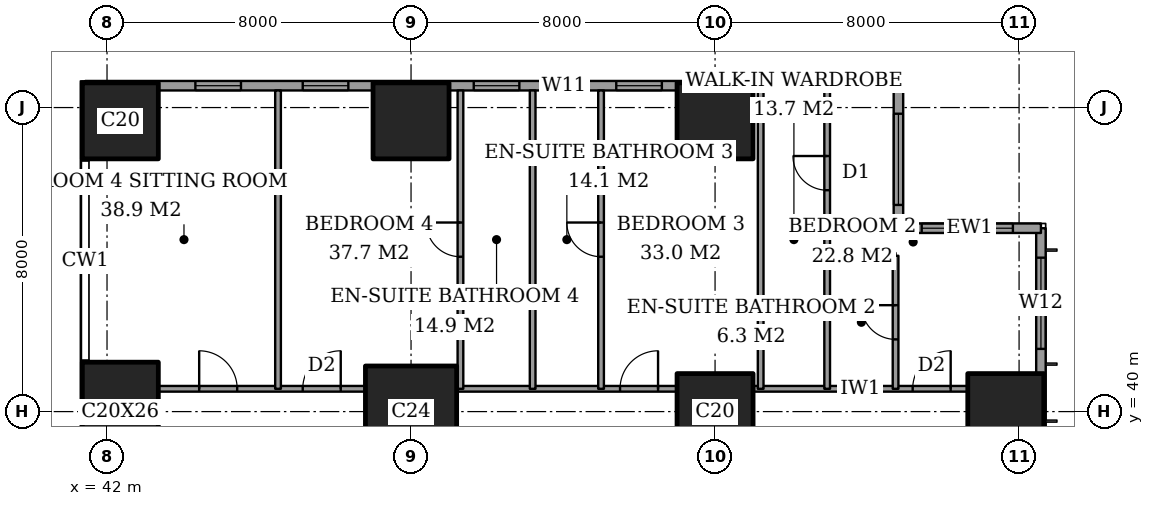
"""IFC4 building model, lengths in metres.
Left out: names, types, materials, properties, quantities, classifications, styles, units other than length and angle.
Written with IfcOpenShell. Run it as: python <this file> out.ifc"""

import sys

from ifc_helpers import new_model, si_unit, direction, frame, frame_2d, origin, origin_2d, place, context, subcontext, project, spatial, rectangle, extrude, element, fill, save


model = new_model("IFC4")
c1 = context("Model", 3, precision=1e-05, world=origin(), true_north=direction((0.0, 1.0)))
c2 = subcontext(c1, "Body", "Model", "MODEL_VIEW")
j1 = project(units=[si_unit("LENGTHUNIT", "METRE"), si_unit("PLANEANGLEUNIT", "RADIAN")], contexts=[c1])
p1 = place(None, origin())
s1 = spatial("IfcSite", under=j1, at=p1, CompositionType="ELEMENT")
p2 = place(p1, origin())
s2 = spatial("IfcBuilding", under=s1, at=p2, CompositionType="ELEMENT")
p3 = place(p2, frame((0.0, 0.0, 168.2)))
s3 = spatial("IfcBuildingStorey", under=s2, at=p3, CompositionType="ELEMENT", Elevation=168.2)
p4 = place(p3, frame((42.35, 40.0, 0.0), z_axis=(0.0, 0.0, 1.0), x_axis=(1.0, 0.0, 0.0)))
e1 = element("IfcColumn", 1, at=p4, inside=s3, PredefinedType="COLUMN", context=c2, shape_type="SweptSolid", body=[
    extrude(rectangle(XDim=2.0, YDim=2.6, at=origin_2d()), origin(), (0.0, 0.0, 1.0), 3.6),
])
p5 = place(p3, frame((42.35, 47.65, 0.0), z_axis=(0.0, 0.0, 1.0), x_axis=(1.0, 0.0, 0.0)))
e2 = element("IfcColumn", 2, at=p5, inside=s3, PredefinedType="COLUMN", context=c2, shape_type="SweptSolid", body=[
    extrude(rectangle(XDim=2.0, YDim=2.0, at=origin_2d()), origin(), (0.0, 0.0, 1.0), 3.6),
])
p6 = place(p3, frame((50.0, 40.0, 0.0), z_axis=(0.0, 0.0, 1.0), x_axis=(1.0, 0.0, 0.0)))
e3 = element("IfcColumn", 3, at=p6, inside=s3, PredefinedType="COLUMN", context=c2, shape_type="SweptSolid", body=[
    extrude(rectangle(XDim=2.4, YDim=2.4, at=origin_2d()), origin(), (0.0, 0.0, 1.0), 3.6),
])
for number, where, z_axis, x_axis in (
    (4, (50.0, 47.65, 0.0), (0.0, 0.0, 1.0), (1.0, 0.0, 0.0)),
    (5, (58.0, 40.0, 0.0), (0.0, 0.0, 1.0), (1.0, 0.0, 0.0)),
    (6, (58.0, 47.65, 0.0), (0.0, 0.0, 1.0), (1.0, 0.0, 0.0)),
    (7, (65.65, 40.0, 0.0), (0.0, 0.0, 1.0), (1.0, 0.0, 0.0)),
):
    element("IfcColumn", number, at=place(p3, frame(where, z_axis=z_axis, x_axis=x_axis)), inside=s3, PredefinedType="COLUMN", context=c2, shape_type="SweptSolid", body=[
        extrude(rectangle(XDim=2.0, YDim=2.0, at=origin_2d()), origin(), (0.0, 0.0, 1.0), 3.6),
    ])
p7 = place(p3, frame((66.575, 3.175, 0.0), z_axis=(0.0, 0.0, 1.0), x_axis=(0.0, 1.0, 0.0)))
e8 = element("IfcWall", 8, at=p7, inside=s3, PredefinedType="SOLIDWALL", context=c2, shape_type="SweptSolid", body=[
    extrude(rectangle(XDim=41.65, YDim=0.25, at=frame_2d((20.825, 0.0))), origin(), (0.0, 0.0, 1.0), 3.6),
])
p8 = place(p7, frame((0.775, 0.0, 0.4)))
e9 = element("IfcOpeningElement", 9, at=p8, cuts=e8, PredefinedType="OPENING", context=c2, shape_type="SweptSolid", body=[
    extrude(rectangle(XDim=2.4, YDim=2.2, at=frame_2d((1.2, 1.1))), frame((0.0, 0.135, 0.0), z_axis=(0.0, -1.0, 0.0), x_axis=(1.0, 0.0, 0.0)), (0.0, 0.0, 1.0), 0.27),
])
p9 = place(p7, frame((6.225, 0.0, 0.4)))
e10 = element("IfcOpeningElement", 10, at=p9, cuts=e8, PredefinedType="OPENING", context=c2, shape_type="SweptSolid", body=[
    extrude(rectangle(XDim=1.2, YDim=2.2, at=frame_2d((0.6, 1.1))), frame((0.0, 0.135, 0.0), z_axis=(0.0, -1.0, 0.0), x_axis=(1.0, 0.0, 0.0)), (0.0, 0.0, 1.0), 0.27),
])
p10 = place(p7, frame((8.475, 0.0, 0.4)))
e11 = element("IfcOpeningElement", 11, at=p10, cuts=e8, PredefinedType="OPENING", context=c2, shape_type="SweptSolid", body=[
    extrude(rectangle(XDim=2.4, YDim=2.2, at=frame_2d((1.2, 1.1))), frame((0.0, 0.135, 0.0), z_axis=(0.0, -1.0, 0.0), x_axis=(1.0, 0.0, 0.0)), (0.0, 0.0, 1.0), 0.27),
])
p11 = place(p7, frame((15.775, 0.0, 0.4)))
e12 = element("IfcOpeningElement", 12, at=p11, cuts=e8, PredefinedType="OPENING", context=c2, shape_type="SweptSolid", body=[
    extrude(rectangle(XDim=2.4, YDim=2.2, at=frame_2d((1.2, 1.1))), frame((0.0, 0.135, 0.0), z_axis=(0.0, -1.0, 0.0), x_axis=(1.0, 0.0, 0.0)), (0.0, 0.0, 1.0), 0.27),
])
p12 = place(p7, frame((23.475, 0.0, 0.4)))
e13 = element("IfcOpeningElement", 13, at=p12, cuts=e8, PredefinedType="OPENING", context=c2, shape_type="SweptSolid", body=[
    extrude(rectangle(XDim=2.4, YDim=2.2, at=frame_2d((1.2, 1.1))), frame((0.0, 0.135, 0.0), z_axis=(0.0, -1.0, 0.0), x_axis=(1.0, 0.0, 0.0)), (0.0, 0.0, 1.0), 0.27),
])
p13 = place(p7, frame((30.975, 0.0, 0.4)))
e14 = element("IfcOpeningElement", 14, at=p13, cuts=e8, PredefinedType="OPENING", context=c2, shape_type="SweptSolid", body=[
    extrude(rectangle(XDim=2.4, YDim=2.2, at=frame_2d((1.2, 1.1))), frame((0.0, 0.135, 0.0), z_axis=(0.0, -1.0, 0.0), x_axis=(1.0, 0.0, 0.0)), (0.0, 0.0, 1.0), 0.27),
])
p14 = place(p7, frame((34.5, 0.0, 0.4)))
e15 = element("IfcOpeningElement", 15, at=p14, cuts=e8, PredefinedType="OPENING", context=c2, shape_type="SweptSolid", body=[
    extrude(rectangle(XDim=1.2, YDim=2.2, at=frame_2d((0.6, 1.1))), frame((0.0, 0.135, 0.0), z_axis=(0.0, -1.0, 0.0), x_axis=(1.0, 0.0, 0.0)), (0.0, 0.0, 1.0), 0.27),
])
p15 = place(p7, frame((38.475, 0.0, 0.4)))
e16 = element("IfcOpeningElement", 16, at=p15, cuts=e8, PredefinedType="OPENING", context=c2, shape_type="SweptSolid", body=[
    extrude(rectangle(XDim=2.4, YDim=2.2, at=frame_2d((1.2, 1.1))), frame((0.0, 0.135, 0.0), z_axis=(0.0, -1.0, 0.0), x_axis=(1.0, 0.0, 0.0)), (0.0, 0.0, 1.0), 0.27),
])
p16 = place(p3, frame((66.575, 44.825, 0.0), z_axis=(0.0, 0.0, 1.0), x_axis=(-1.0, 0.0, 0.0)))
e17 = element("IfcWall", 17, at=p16, inside=s3, PredefinedType="SOLIDWALL", context=c2, shape_type="SweptSolid", body=[
    extrude(rectangle(XDim=3.75, YDim=0.25, at=frame_2d((1.875, 0.0))), origin(), (0.0, 0.0, 1.0), 3.6),
])
p17 = place(p16, frame((0.738, 0.0, 0.4)))
e18 = element("IfcOpeningElement", 18, at=p17, cuts=e17, PredefinedType="OPENING", context=c2, shape_type="SweptSolid", body=[
    extrude(rectangle(XDim=2.4, YDim=2.2, at=frame_2d((1.2, 1.1))), frame((0.0, 0.135, 0.0), z_axis=(0.0, -1.0, 0.0), x_axis=(1.0, 0.0, 0.0)), (0.0, 0.0, 1.0), 0.27),
])
p18 = place(p3, frame((62.825, 44.825, 0.0), z_axis=(0.0, 0.0, 1.0), x_axis=(0.0, 1.0, 0.0)))
e19 = element("IfcWall", 19, at=p18, inside=s3, PredefinedType="SOLIDWALL", context=c2, shape_type="SweptSolid", body=[
    extrude(rectangle(XDim=3.75, YDim=0.25, at=frame_2d((1.875, 0.0))), origin(), (0.0, 0.0, 1.0), 3.6),
])
p19 = place(p18, frame((0.613, 0.0, 0.4)))
e20 = element("IfcOpeningElement", 20, at=p19, cuts=e19, PredefinedType="OPENING", context=c2, shape_type="SweptSolid", body=[
    extrude(rectangle(XDim=2.4, YDim=2.2, at=frame_2d((1.2, 1.1))), frame((0.0, 0.135, 0.0), z_axis=(0.0, -1.0, 0.0), x_axis=(1.0, 0.0, 0.0)), (0.0, 0.0, 1.0), 0.27),
])
p20 = place(p3, frame((62.825, 48.575, 0.0), z_axis=(0.0, 0.0, 1.0), x_axis=(-1.0, 0.0, 0.0)))
e21 = element("IfcWall", 21, at=p20, inside=s3, PredefinedType="SOLIDWALL", context=c2, shape_type="SweptSolid", body=[
    extrude(rectangle(XDim=21.4, YDim=0.25, at=frame_2d((10.7, 0.0))), origin(), (0.0, 0.0, 1.0), 3.6),
])
p21 = place(p20, frame((0.475, 0.0, 0.4)))
e22 = element("IfcOpeningElement", 22, at=p21, cuts=e21, PredefinedType="OPENING", context=c2, shape_type="SweptSolid", body=[
    extrude(rectangle(XDim=1.2, YDim=2.2, at=frame_2d((0.6, 1.1))), frame((0.0, 0.135, 0.0), z_axis=(0.0, -1.0, 0.0), x_axis=(1.0, 0.0, 0.0)), (0.0, 0.0, 1.0), 0.27),
])
p22 = place(p20, frame((2.225, 0.0, 0.4)))
e23 = element("IfcOpeningElement", 23, at=p22, cuts=e21, PredefinedType="OPENING", context=c2, shape_type="SweptSolid", body=[
    extrude(rectangle(XDim=1.2, YDim=2.2, at=frame_2d((0.6, 1.1))), frame((0.0, 0.135, 0.0), z_axis=(0.0, -1.0, 0.0), x_axis=(1.0, 0.0, 0.0)), (0.0, 0.0, 1.0), 0.27),
])
p23 = place(p20, frame((6.225, 0.0, 0.4)))
e24 = element("IfcOpeningElement", 24, at=p23, cuts=e21, PredefinedType="OPENING", context=c2, shape_type="SweptSolid", body=[
    extrude(rectangle(XDim=1.2, YDim=2.2, at=frame_2d((0.6, 1.1))), frame((0.0, 0.135, 0.0), z_axis=(0.0, -1.0, 0.0), x_axis=(1.0, 0.0, 0.0)), (0.0, 0.0, 1.0), 0.27),
])
p24 = place(p20, frame((8.2, 0.0, 0.4)))
e25 = element("IfcOpeningElement", 25, at=p24, cuts=e21, PredefinedType="OPENING", context=c2, shape_type="SweptSolid", body=[
    extrude(rectangle(XDim=1.2, YDim=2.2, at=frame_2d((0.6, 1.1))), frame((0.0, 0.135, 0.0), z_axis=(0.0, -1.0, 0.0), x_axis=(1.0, 0.0, 0.0)), (0.0, 0.0, 1.0), 0.27),
])
p25 = place(p20, frame((9.975, 0.0, 0.4)))
e26 = element("IfcOpeningElement", 26, at=p25, cuts=e21, PredefinedType="OPENING", context=c2, shape_type="SweptSolid", body=[
    extrude(rectangle(XDim=1.2, YDim=2.2, at=frame_2d((0.6, 1.1))), frame((0.0, 0.135, 0.0), z_axis=(0.0, -1.0, 0.0), x_axis=(1.0, 0.0, 0.0)), (0.0, 0.0, 1.0), 0.27),
])
p26 = place(p20, frame((14.475, 0.0, 0.4)))
e27 = element("IfcOpeningElement", 27, at=p26, cuts=e21, PredefinedType="OPENING", context=c2, shape_type="SweptSolid", body=[
    extrude(rectangle(XDim=1.2, YDim=2.2, at=frame_2d((0.6, 1.1))), frame((0.0, 0.135, 0.0), z_axis=(0.0, -1.0, 0.0), x_axis=(1.0, 0.0, 0.0)), (0.0, 0.0, 1.0), 0.27),
])
p27 = place(p20, frame((17.3, 0.0, 0.4)))
e28 = element("IfcOpeningElement", 28, at=p27, cuts=e21, PredefinedType="OPENING", context=c2, shape_type="SweptSolid", body=[
    extrude(rectangle(XDim=1.2, YDim=2.2, at=frame_2d((0.6, 1.1))), frame((0.0, 0.135, 0.0), z_axis=(0.0, -1.0, 0.0), x_axis=(1.0, 0.0, 0.0)), (0.0, 0.0, 1.0), 0.27),
])
p28 = place(p3, frame((43.35, 40.6, 0.0), z_axis=(0.0, 0.0, 1.0), x_axis=(1.0, 0.0, 0.0)))
e29 = element("IfcWall", 29, at=p28, inside=s3, PredefinedType="PARTITIONING", context=c2, shape_type="SweptSolid", body=[
    extrude(rectangle(XDim=5.45, YDim=0.15, at=frame_2d((2.725, 0.0))), origin(), (0.0, 0.0, 1.0), 3.25),
])
p29 = place(p28, frame((3.8, 0.0, 0.0)))
e30 = element("IfcOpeningElement", 30, at=p29, cuts=e29, PredefinedType="OPENING", context=c2, shape_type="SweptSolid", body=[
    extrude(rectangle(XDim=1.0, YDim=2.1, at=frame_2d((0.5, 1.05))), frame((0.0, 0.085, 0.0), z_axis=(0.0, -1.0, 0.0), x_axis=(1.0, 0.0, 0.0)), (0.0, 0.0, 1.0), 0.17),
])
p30 = place(p28, frame((1.075, 0.0, 0.0)))
e31 = element("IfcOpeningElement", 31, at=p30, cuts=e29, PredefinedType="OPENING", context=c2, shape_type="SweptSolid", body=[
    extrude(rectangle(XDim=1.0, YDim=2.1, at=frame_2d((0.5, 1.05))), frame((0.0, 0.085, 0.0), z_axis=(0.0, -1.0, 0.0), x_axis=(1.0, 0.0, 0.0)), (0.0, 0.0, 1.0), 0.17),
])
p31 = place(p3, frame((51.2, 40.6, 0.0), z_axis=(0.0, 0.0, 1.0), x_axis=(1.0, 0.0, 0.0)))
e32 = element("IfcWall", 32, at=p31, inside=s3, PredefinedType="PARTITIONING", context=c2, shape_type="SweptSolid", body=[
    extrude(rectangle(XDim=5.8, YDim=0.15, at=frame_2d((2.9, 0.0))), origin(), (0.0, 0.0, 1.0), 3.25),
])
p32 = place(p31, frame((4.3, 0.0, 0.0)))
e33 = element("IfcOpeningElement", 33, at=p32, cuts=e32, PredefinedType="OPENING", context=c2, shape_type="SweptSolid", body=[
    extrude(rectangle(XDim=1.0, YDim=2.1, at=frame_2d((0.5, 1.05))), frame((0.0, 0.085, 0.0), z_axis=(0.0, -1.0, 0.0), x_axis=(1.0, 0.0, 0.0)), (0.0, 0.0, 1.0), 0.17),
])
p33 = place(p3, frame((59.0, 40.6, 0.0), z_axis=(0.0, 0.0, 1.0), x_axis=(1.0, 0.0, 0.0)))
e34 = element("IfcWall", 34, at=p33, inside=s3, PredefinedType="PARTITIONING", context=c2, shape_type="SweptSolid", body=[
    extrude(rectangle(XDim=5.65, YDim=0.15, at=frame_2d((2.825, 0.0))), origin(), (0.0, 0.0, 1.0), 3.25),
])
p34 = place(p33, frame((4.2, 0.0, 0.0)))
e35 = element("IfcOpeningElement", 35, at=p34, cuts=e34, PredefinedType="OPENING", context=c2, shape_type="SweptSolid", body=[
    extrude(rectangle(XDim=1.0, YDim=2.1, at=frame_2d((0.5, 1.05))), frame((0.0, 0.085, 0.0), z_axis=(0.0, -1.0, 0.0), x_axis=(1.0, 0.0, 0.0)), (0.0, 0.0, 1.0), 0.17),
])
p35 = place(p3, frame((60.95, 44.1, 0.0), z_axis=(0.0, 0.0, 1.0), x_axis=(1.0, 0.0, 0.0)))
e36 = element("IfcWall", 36, at=p35, inside=s3, PredefinedType="PARTITIONING", context=c2, shape_type="SweptSolid", body=[
    extrude(rectangle(XDim=1.8, YDim=0.15, at=frame_2d((0.9, 0.0))), origin(), (0.0, 0.0, 1.0), 3.25),
])
p36 = place(p3, frame((46.5, 40.6, 0.0), z_axis=(0.0, 0.0, 1.0), x_axis=(0.0, 1.0, 0.0)))
e37 = element("IfcWall", 37, at=p36, inside=s3, PredefinedType="PARTITIONING", context=c2, shape_type="SweptSolid", body=[
    extrude(rectangle(XDim=7.85, YDim=0.15, at=frame_2d((3.925, 0.0))), origin(), (0.0, 0.0, 1.0), 3.25),
])
p37 = place(p3, frame((51.3, 40.6, 0.0), z_axis=(0.0, 0.0, 1.0), x_axis=(0.0, 1.0, 0.0)))
e38 = element("IfcWall", 38, at=p37, inside=s3, PredefinedType="PARTITIONING", context=c2, shape_type="SweptSolid", body=[
    extrude(rectangle(XDim=7.85, YDim=0.15, at=frame_2d((3.925, 0.0))), origin(), (0.0, 0.0, 1.0), 3.25),
])
p38 = place(p37, frame((3.475, 0.0, 0.0)))
e39 = element("IfcOpeningElement", 39, at=p38, cuts=e38, PredefinedType="OPENING", context=c2, shape_type="SweptSolid", body=[
    extrude(rectangle(XDim=0.9, YDim=2.1, at=frame_2d((0.45, 1.05))), frame((0.0, 0.085, 0.0), z_axis=(0.0, -1.0, 0.0), x_axis=(1.0, 0.0, 0.0)), (0.0, 0.0, 1.0), 0.17),
])
p39 = place(p3, frame((53.2, 40.6, 0.0), z_axis=(0.0, 0.0, 1.0), x_axis=(0.0, 1.0, 0.0)))
e40 = element("IfcWall", 40, at=p39, inside=s3, PredefinedType="PARTITIONING", context=c2, shape_type="SweptSolid", body=[
    extrude(rectangle(XDim=7.85, YDim=0.15, at=frame_2d((3.925, 0.0))), origin(), (0.0, 0.0, 1.0), 3.25),
])
p40 = place(p3, frame((55.0, 40.6, 0.0), z_axis=(0.0, 0.0, 1.0), x_axis=(0.0, 1.0, 0.0)))
e41 = element("IfcWall", 41, at=p40, inside=s3, PredefinedType="PARTITIONING", context=c2, shape_type="SweptSolid", body=[
    extrude(rectangle(XDim=7.85, YDim=0.15, at=frame_2d((3.925, 0.0))), origin(), (0.0, 0.0, 1.0), 3.25),
])
p41 = place(p40, frame((3.475, 0.0, 0.0)))
e42 = element("IfcOpeningElement", 42, at=p41, cuts=e41, PredefinedType="OPENING", context=c2, shape_type="SweptSolid", body=[
    extrude(rectangle(XDim=0.9, YDim=2.1, at=frame_2d((0.45, 1.05))), frame((0.0, 0.085, 0.0), z_axis=(0.0, -1.0, 0.0), x_axis=(1.0, 0.0, 0.0)), (0.0, 0.0, 1.0), 0.17),
])
p42 = place(p3, frame((59.2, 40.6, 0.0), z_axis=(0.0, 0.0, 1.0), x_axis=(0.0, 1.0, 0.0)))
e43 = element("IfcWall", 43, at=p42, inside=s3, PredefinedType="PARTITIONING", context=c2, shape_type="SweptSolid", body=[
    extrude(rectangle(XDim=7.85, YDim=0.15, at=frame_2d((3.925, 0.0))), origin(), (0.0, 0.0, 1.0), 3.25),
])
p43 = place(p3, frame((60.95, 40.6, 0.0), z_axis=(0.0, 0.0, 1.0), x_axis=(0.0, 1.0, 0.0)))
e44 = element("IfcWall", 44, at=p43, inside=s3, PredefinedType="PARTITIONING", context=c2, shape_type="SweptSolid", body=[
    extrude(rectangle(XDim=7.85, YDim=0.15, at=frame_2d((3.925, 0.0))), origin(), (0.0, 0.0, 1.0), 3.25),
])
p44 = place(p43, frame((5.225, 0.0, 0.0)))
e45 = element("IfcOpeningElement", 45, at=p44, cuts=e44, PredefinedType="OPENING", context=c2, shape_type="SweptSolid", body=[
    extrude(rectangle(XDim=0.9, YDim=2.1, at=frame_2d((0.45, 1.05))), frame((0.0, 0.085, 0.0), z_axis=(0.0, -1.0, 0.0), x_axis=(1.0, 0.0, 0.0)), (0.0, 0.0, 1.0), 0.17),
])
p45 = place(p3, frame((62.75, 40.6, 0.0), z_axis=(0.0, 0.0, 1.0), x_axis=(0.0, 1.0, 0.0)))
e46 = element("IfcWall", 46, at=p45, inside=s3, PredefinedType="PARTITIONING", context=c2, shape_type="SweptSolid", body=[
    extrude(rectangle(XDim=3.5, YDim=0.15, at=frame_2d((1.75, 0.0))), origin(), (0.0, 0.0, 1.0), 3.25),
])
p46 = place(p45, frame((1.3, 0.0, 0.0)))
e47 = element("IfcOpeningElement", 47, at=p46, cuts=e46, PredefinedType="OPENING", context=c2, shape_type="SweptSolid", body=[
    extrude(rectangle(XDim=0.9, YDim=2.1, at=frame_2d((0.45, 1.05))), frame((0.0, 0.085, 0.0), z_axis=(0.0, -1.0, 0.0), x_axis=(1.0, 0.0, 0.0)), (0.0, 0.0, 1.0), 0.17),
])
p47 = place(p15, origin())
e48 = element("IfcWindow", 48, at=p47, inside=s3, PartitioningType="SINGLE_PANEL", PredefinedType="WINDOW", context=c2, shape_type="SweptSolid", body=[
    extrude(rectangle(XDim=2.4, YDim=2.2, at=frame_2d((1.2, 1.1))), frame((0.0, 0.03, 0.0), z_axis=(0.0, -1.0, 0.0), x_axis=(1.0, 0.0, 0.0)), (0.0, 0.0, 1.0), 0.06),
])
fill(e16, e48)
p48 = place(p17, origin())
e49 = element("IfcWindow", 49, at=p48, inside=s3, PartitioningType="SINGLE_PANEL", PredefinedType="WINDOW", context=c2, shape_type="SweptSolid", body=[
    extrude(rectangle(XDim=2.4, YDim=2.2, at=frame_2d((1.2, 1.1))), frame((0.0, 0.03, 0.0), z_axis=(0.0, -1.0, 0.0), x_axis=(1.0, 0.0, 0.0)), (0.0, 0.0, 1.0), 0.06),
])
fill(e18, e49)
p49 = place(p19, origin())
e50 = element("IfcWindow", 50, at=p49, inside=s3, PartitioningType="SINGLE_PANEL", PredefinedType="WINDOW", context=c2, shape_type="SweptSolid", body=[
    extrude(rectangle(XDim=2.4, YDim=2.2, at=frame_2d((1.2, 1.1))), frame((0.0, 0.03, 0.0), z_axis=(0.0, -1.0, 0.0), x_axis=(1.0, 0.0, 0.0)), (0.0, 0.0, 1.0), 0.06),
])
fill(e20, e50)
p50 = place(p21, origin())
e51 = element("IfcWindow", 51, at=p50, inside=s3, PartitioningType="SINGLE_PANEL", PredefinedType="WINDOW", context=c2, shape_type="SweptSolid", body=[
    extrude(rectangle(XDim=1.2, YDim=2.2, at=frame_2d((0.6, 1.1))), frame((0.0, 0.03, 0.0), z_axis=(0.0, -1.0, 0.0), x_axis=(1.0, 0.0, 0.0)), (0.0, 0.0, 1.0), 0.06),
])
fill(e22, e51)
p51 = place(p22, origin())
e52 = element("IfcWindow", 52, at=p51, inside=s3, PartitioningType="SINGLE_PANEL", PredefinedType="WINDOW", context=c2, shape_type="SweptSolid", body=[
    extrude(rectangle(XDim=1.2, YDim=2.2, at=frame_2d((0.6, 1.1))), frame((0.0, 0.03, 0.0), z_axis=(0.0, -1.0, 0.0), x_axis=(1.0, 0.0, 0.0)), (0.0, 0.0, 1.0), 0.06),
])
fill(e23, e52)
p52 = place(p23, origin())
e53 = element("IfcWindow", 53, at=p52, inside=s3, PartitioningType="SINGLE_PANEL", PredefinedType="WINDOW", context=c2, shape_type="SweptSolid", body=[
    extrude(rectangle(XDim=1.2, YDim=2.2, at=frame_2d((0.6, 1.1))), frame((0.0, 0.03, 0.0), z_axis=(0.0, -1.0, 0.0), x_axis=(1.0, 0.0, 0.0)), (0.0, 0.0, 1.0), 0.06),
])
fill(e24, e53)
p53 = place(p24, origin())
e54 = element("IfcWindow", 54, at=p53, inside=s3, PartitioningType="SINGLE_PANEL", PredefinedType="WINDOW", context=c2, shape_type="SweptSolid", body=[
    extrude(rectangle(XDim=1.2, YDim=2.2, at=frame_2d((0.6, 1.1))), frame((0.0, 0.03, 0.0), z_axis=(0.0, -1.0, 0.0), x_axis=(1.0, 0.0, 0.0)), (0.0, 0.0, 1.0), 0.06),
])
fill(e25, e54)
p54 = place(p25, origin())
e55 = element("IfcWindow", 55, at=p54, inside=s3, PartitioningType="SINGLE_PANEL", PredefinedType="WINDOW", context=c2, shape_type="SweptSolid", body=[
    extrude(rectangle(XDim=1.2, YDim=2.2, at=frame_2d((0.6, 1.1))), frame((0.0, 0.03, 0.0), z_axis=(0.0, -1.0, 0.0), x_axis=(1.0, 0.0, 0.0)), (0.0, 0.0, 1.0), 0.06),
])
fill(e26, e55)
p55 = place(p26, origin())
e56 = element("IfcWindow", 56, at=p55, inside=s3, PartitioningType="SINGLE_PANEL", PredefinedType="WINDOW", context=c2, shape_type="SweptSolid", body=[
    extrude(rectangle(XDim=1.2, YDim=2.2, at=frame_2d((0.6, 1.1))), frame((0.0, 0.03, 0.0), z_axis=(0.0, -1.0, 0.0), x_axis=(1.0, 0.0, 0.0)), (0.0, 0.0, 1.0), 0.06),
])
fill(e27, e56)
p56 = place(p27, origin())
e57 = element("IfcWindow", 57, at=p56, inside=s3, PartitioningType="SINGLE_PANEL", PredefinedType="WINDOW", context=c2, shape_type="SweptSolid", body=[
    extrude(rectangle(XDim=1.2, YDim=2.2, at=frame_2d((0.6, 1.1))), frame((0.0, 0.03, 0.0), z_axis=(0.0, -1.0, 0.0), x_axis=(1.0, 0.0, 0.0)), (0.0, 0.0, 1.0), 0.06),
])
fill(e28, e57)
p57 = place(p46, origin())
e58 = element("IfcDoor", 58, at=p57, inside=s3, OperationType="SINGLE_SWING_LEFT", PredefinedType="DOOR", context=c2, shape_type="SweptSolid", body=[
    extrude(rectangle(XDim=0.9, YDim=2.1, at=frame_2d((0.45, 1.05))), frame((0.0, 0.025, 0.0), z_axis=(0.0, -1.0, 0.0), x_axis=(1.0, 0.0, 0.0)), (0.0, 0.0, 1.0), 0.05),
])
fill(e47, e58)
p58 = place(p34, origin())
e59 = element("IfcDoor", 59, at=p58, inside=s3, OperationType="SINGLE_SWING_LEFT", PredefinedType="DOOR", context=c2, shape_type="SweptSolid", body=[
    extrude(rectangle(XDim=1.0, YDim=2.1, at=frame_2d((0.5, 1.05))), frame((0.0, 0.025, 0.0), z_axis=(0.0, -1.0, 0.0), x_axis=(1.0, 0.0, 0.0)), (0.0, 0.0, 1.0), 0.05),
])
fill(e35, e59)
p59 = place(p44, origin())
e60 = element("IfcDoor", 60, at=p59, inside=s3, OperationType="SINGLE_SWING_LEFT", PredefinedType="DOOR", context=c2, shape_type="SweptSolid", body=[
    extrude(rectangle(XDim=0.9, YDim=2.1, at=frame_2d((0.45, 1.05))), frame((0.0, 0.025, 0.0), z_axis=(0.0, -1.0, 0.0), x_axis=(1.0, 0.0, 0.0)), (0.0, 0.0, 1.0), 0.05),
])
fill(e45, e60)
p60 = place(p32, origin())
e61 = element("IfcDoor", 61, at=p60, inside=s3, OperationType="SINGLE_SWING_LEFT", PredefinedType="DOOR", context=c2, shape_type="SweptSolid", body=[
    extrude(rectangle(XDim=1.0, YDim=2.1, at=frame_2d((0.5, 1.05))), frame((0.0, 0.025, 0.0), z_axis=(0.0, -1.0, 0.0), x_axis=(1.0, 0.0, 0.0)), (0.0, 0.0, 1.0), 0.05),
])
fill(e33, e61)
p61 = place(p41, origin())
e62 = element("IfcDoor", 62, at=p61, inside=s3, OperationType="SINGLE_SWING_LEFT", PredefinedType="DOOR", context=c2, shape_type="SweptSolid", body=[
    extrude(rectangle(XDim=0.9, YDim=2.1, at=frame_2d((0.45, 1.05))), frame((0.0, 0.025, 0.0), z_axis=(0.0, -1.0, 0.0), x_axis=(1.0, 0.0, 0.0)), (0.0, 0.0, 1.0), 0.05),
])
fill(e42, e62)
p62 = place(p38, origin())
e63 = element("IfcDoor", 63, at=p62, inside=s3, OperationType="SINGLE_SWING_LEFT", PredefinedType="DOOR", context=c2, shape_type="SweptSolid", body=[
    extrude(rectangle(XDim=0.9, YDim=2.1, at=frame_2d((0.45, 1.05))), frame((0.0, 0.025, 0.0), z_axis=(0.0, -1.0, 0.0), x_axis=(1.0, 0.0, 0.0)), (0.0, 0.0, 1.0), 0.05),
])
fill(e39, e63)
p63 = place(p29, origin())
e64 = element("IfcDoor", 64, at=p63, inside=s3, OperationType="SINGLE_SWING_LEFT", PredefinedType="DOOR", context=c2, shape_type="SweptSolid", body=[
    extrude(rectangle(XDim=1.0, YDim=2.1, at=frame_2d((0.5, 1.05))), frame((0.0, 0.025, 0.0), z_axis=(0.0, -1.0, 0.0), x_axis=(1.0, 0.0, 0.0)), (0.0, 0.0, 1.0), 0.05),
])
fill(e30, e64)
p64 = place(p30, origin())
e65 = element("IfcDoor", 65, at=p64, inside=s3, OperationType="SINGLE_SWING_RIGHT", PredefinedType="DOOR", context=c2, shape_type="SweptSolid", body=[
    extrude(rectangle(XDim=1.0, YDim=2.1, at=frame_2d((0.5, 1.05))), frame((0.0, 0.025, 0.0), z_axis=(0.0, -1.0, 0.0), x_axis=(1.0, 0.0, 0.0)), (0.0, 0.0, 1.0), 0.05),
])
fill(e31, e65)
save(model, sys.argv[1])
